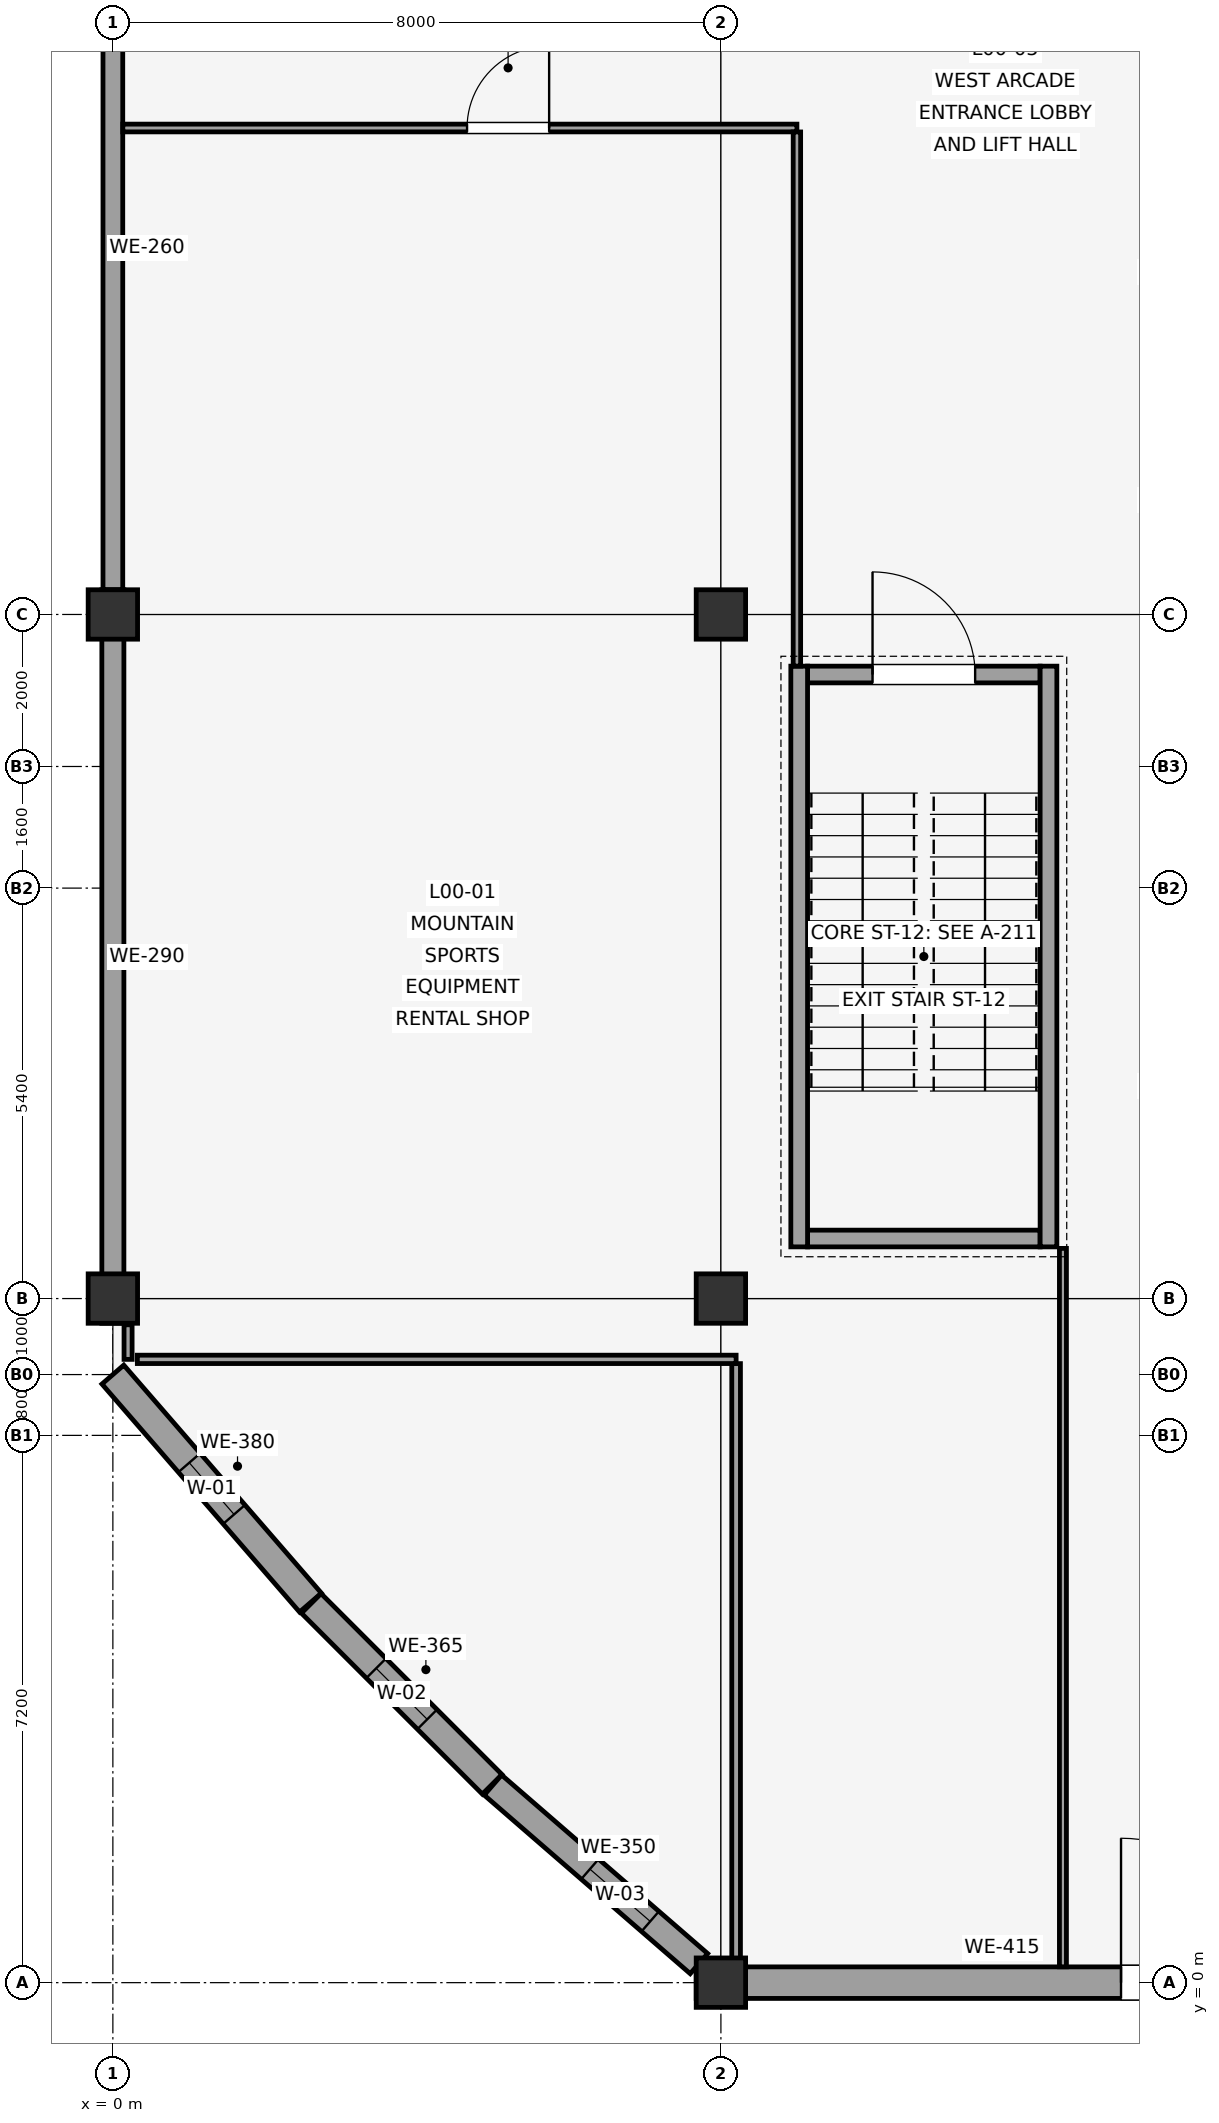
"""IFC4 building model, lengths in metres.
Left out: names, types, materials, properties, quantities, classifications, styles, units other than length and angle.
Written with IfcOpenShell. Run it as: python <this file> out.ifc"""

import sys

from ifc_helpers import new_model, si_unit, direction, frame, frame_2d, origin, origin_2d, place, context, subcontext, project, spatial, rectangle, extrude, element, fill, save


model = new_model("IFC4")
c1 = context("Model", 3, precision=1e-05, world=origin(), true_north=direction((0.0, 1.0)))
c2 = subcontext(c1, "Body", "Model", "MODEL_VIEW")
j1 = project(units=[si_unit("LENGTHUNIT", "METRE"), si_unit("PLANEANGLEUNIT", "RADIAN")], contexts=[c1])
p1 = place(None, origin())
s1 = spatial("IfcSite", under=j1, at=p1, CompositionType="ELEMENT")
p2 = place(p1, origin())
s2 = spatial("IfcBuilding", under=s1, at=p2, CompositionType="ELEMENT")
p3 = place(p2, origin())
s3 = spatial("IfcBuildingStorey", under=s2, at=p3, CompositionType="ELEMENT", Elevation=0.0)
for number, where, z_axis, x_axis in (
    (1, (0.0, 9.0, 0.0), (0.0, 0.0, 1.0), (1.0, 0.0, 0.0)),
    (2, (0.0, 18.0, 0.0), (0.0, 0.0, 1.0), (1.0, 0.0, 0.0)),
    (3, (8.0, 0.0, 0.0), (0.0, 0.0, 1.0), (1.0, 0.0, 0.0)),
    (4, (8.0, 9.0, 0.0), (0.0, 0.0, 1.0), (1.0, 0.0, 0.0)),
    (5, (8.0, 18.0, 0.0), (0.0, 0.0, 1.0), (1.0, 0.0, 0.0)),
):
    element("IfcColumn", number, at=place(p3, frame(where, z_axis=z_axis, x_axis=x_axis)), inside=s3, PredefinedType="COLUMN", context=c2, shape_type="SweptSolid", body=[
        extrude(rectangle(XDim=0.65, YDim=0.65, at=origin_2d()), origin(), (0.0, 0.0, 1.0), 4.5),
    ])
p4 = place(p3, frame((7.675, 0.0, 0.0), z_axis=(0.0, 0.0, 1.0), x_axis=(1.0, 0.0, 0.0)))
e6 = element("IfcWall", 6, at=p4, inside=s3, PredefinedType="SOLIDWALL", context=c2, shape_type="SweptSolid", body=[
    extrude(rectangle(XDim=8.65, YDim=0.415, at=frame_2d((4.325, 0.0))), origin(), (0.0, 0.0, 1.0), 3.12),
])
p5 = place(p4, frame((5.589, 0.0, 0.0)))
e7 = element("IfcOpeningElement", 7, at=p5, cuts=e6, PredefinedType="OPENING", context=c2, shape_type="SweptSolid", body=[
    extrude(rectangle(XDim=1.9, YDim=2.4, at=frame_2d((0.95, 1.2))), frame((0.0, 0.218, 0.0), z_axis=(0.0, -1.0, 0.0), x_axis=(1.0, 0.0, 0.0)), (0.0, 0.0, 1.0), 0.435),
])
p6 = place(p3, frame((0.0, 8.0, 0.0), z_axis=(0.0, 0.0, 1.0), x_axis=(0.654944585876, -0.755676908098, 0.0)))
e8 = element("IfcWall", 8, at=p6, inside=s3, PredefinedType="SOLIDWALL", context=c2, shape_type="SweptSolid", body=[
    extrude(rectangle(XDim=3.97, YDim=0.38, at=frame_2d((1.985, 0.0))), origin(), (0.0, 0.0, 1.0), 3.12),
])
p7 = place(p6, frame((1.535, 0.0, 0.85)))
e9 = element("IfcOpeningElement", 9, at=p7, cuts=e8, PredefinedType="OPENING", context=c2, shape_type="SweptSolid", body=[
    extrude(rectangle(XDim=0.9, YDim=1.8, at=frame_2d((0.45, 0.9))), frame((0.0, 0.2, 0.0), z_axis=(0.0, -1.0, 0.0), x_axis=(1.0, 0.0, 0.0)), (0.0, 0.0, 1.0), 0.4),
])
p8 = place(p3, frame((2.61, 4.99, 0.0), z_axis=(0.0, 0.0, 1.0), x_axis=(0.707143040284, -0.70707052023, 0.0)))
e10 = element("IfcWall", 10, at=p8, inside=s3, PredefinedType="SOLIDWALL", context=c2, shape_type="SweptSolid", body=[
    extrude(rectangle(XDim=3.366, YDim=0.365, at=frame_2d((1.683, 0.0))), origin(), (0.0, 0.0, 1.0), 3.12),
])
p9 = place(p8, frame((1.208, 0.0, 0.85)))
e11 = element("IfcOpeningElement", 11, at=p9, cuts=e10, PredefinedType="OPENING", context=c2, shape_type="SweptSolid", body=[
    extrude(rectangle(XDim=0.95, YDim=1.95, at=frame_2d((0.475, 0.975))), frame((0.0, 0.192, 0.0), z_axis=(0.0, -1.0, 0.0), x_axis=(1.0, 0.0, 0.0)), (0.0, 0.0, 1.0), 0.385),
])
p10 = place(p3, frame((5.0, 2.6, 0.0), z_axis=(0.0, 0.0, 1.0), x_axis=(0.755671119025, -0.654951265264, 0.0)))
e12 = element("IfcWall", 12, at=p10, inside=s3, PredefinedType="SOLIDWALL", context=c2, shape_type="SweptSolid", body=[
    extrude(rectangle(XDim=3.587, YDim=0.35, at=frame_2d((1.794, 0.0))), origin(), (0.0, 0.0, 1.0), 3.12),
])
p11 = place(p10, frame((1.689, 0.0, 0.85)))
e13 = element("IfcOpeningElement", 13, at=p11, cuts=e12, PredefinedType="OPENING", context=c2, shape_type="SweptSolid", body=[
    extrude(rectangle(XDim=1.05, YDim=2.05, at=frame_2d((0.525, 1.025))), frame((0.0, 0.185, 0.0), z_axis=(0.0, -1.0, 0.0), x_axis=(1.0, 0.0, 0.0)), (0.0, 0.0, 1.0), 0.37),
])
p12 = place(p3, frame((0.0, 18.325, 0.0), z_axis=(0.0, 0.0, 1.0), x_axis=(0.0, -1.0, 0.0)))
e14 = element("IfcWall", 14, at=p12, inside=s3, PredefinedType="SOLIDWALL", context=c2, shape_type="SweptSolid", body=[
    extrude(rectangle(XDim=9.65, YDim=0.29, at=frame_2d((4.825, 0.0))), origin(), (0.0, 0.0, 1.0), 3.12),
])
p13 = place(p3, frame((0.0, 27.325, 0.0), z_axis=(0.0, 0.0, 1.0), x_axis=(0.0, -1.0, 0.0)))
e15 = element("IfcWall", 15, at=p13, inside=s3, PredefinedType="SOLIDWALL", context=c2, shape_type="SweptSolid", body=[
    extrude(rectangle(XDim=8.999, YDim=0.26, at=frame_2d((4.5, 0.0))), origin(), (0.0, 0.0, 1.0), 3.12),
])
p14 = place(p3, frame((9.14, 17.21, 0.0), z_axis=(0.0, 0.0, 1.0), x_axis=(1.0, 0.0, 0.0)))
e16 = element("IfcWall", 16, at=p14, inside=s3, PredefinedType="SHEAR", context=c2, shape_type="SweptSolid", body=[
    extrude(rectangle(XDim=3.06, YDim=0.22, at=frame_2d((1.53, 0.0))), origin(), (0.0, 0.0, 1.0), 4.5),
])
p15 = place(p14, frame((0.855, 0.0, 0.0)))
e17 = element("IfcOpeningElement", 17, at=p15, cuts=e16, PredefinedType="OPENING", context=c2, shape_type="SweptSolid", body=[
    extrude(rectangle(XDim=1.35, YDim=2.15, at=frame_2d((0.675, 1.075))), frame((0.0, 0.12, 0.0), z_axis=(0.0, -1.0, 0.0), x_axis=(1.0, 0.0, 0.0)), (0.0, 0.0, 1.0), 0.24),
])
p16 = place(p3, frame((9.14, 9.79, 0.0), z_axis=(0.0, 0.0, 1.0), x_axis=(1.0, 0.0, 0.0)))
e18 = element("IfcWall", 18, at=p16, inside=s3, PredefinedType="SHEAR", context=c2, shape_type="SweptSolid", body=[
    extrude(rectangle(XDim=3.06, YDim=0.22, at=frame_2d((1.53, 0.0))), origin(), (0.0, 0.0, 1.0), 4.5),
])
for number, where, z_axis, x_axis in (
    (19, (9.03, 17.32, 0.0), (0.0, 0.0, 1.0), (0.0, -1.0, 0.0)),
    (20, (12.31, 17.32, 0.0), (0.0, 0.0, 1.0), (0.0, -1.0, 0.0)),
):
    element("IfcWall", number, at=place(p3, frame(where, z_axis=z_axis, x_axis=x_axis)), inside=s3, PredefinedType="SHEAR", context=c2, shape_type="SweptSolid", body=[
        extrude(rectangle(XDim=7.64, YDim=0.22, at=frame_2d((3.82, 0.0))), origin(), (0.0, 0.0, 1.0), 4.5),
    ])
p17 = place(p3, frame((8.2, 0.208, 0.0), z_axis=(0.0, 0.0, 1.0), x_axis=(0.0, 1.0, 0.0)))
e21 = element("IfcWall", 21, at=p17, inside=s3, PredefinedType="PARTITIONING", context=c2, shape_type="SweptSolid", body=[
    extrude(rectangle(XDim=7.936, YDim=0.114, at=frame_2d((3.968, 0.0))), origin(), (0.0, 0.0, 1.0), 2.7),
])
p18 = place(p3, frame((8.2, 8.2, 0.0), z_axis=(0.0, 0.0, 1.0), x_axis=(-1.0, 0.0, 0.0)))
e22 = element("IfcWall", 22, at=p18, inside=s3, PredefinedType="PARTITIONING", context=c2, shape_type="SweptSolid", body=[
    extrude(rectangle(XDim=7.878, YDim=0.11, at=frame_2d((3.939, 0.0))), origin(), (0.0, 0.0, 1.0), 2.7),
])
p19 = place(p3, frame((0.2, 8.2, 0.0), z_axis=(0.0, 0.0, 1.0), x_axis=(0.0, 1.0, 0.0)))
e23 = element("IfcWall", 23, at=p19, inside=s3, PredefinedType="PARTITIONING", context=c2, shape_type="SweptSolid", body=[
    extrude(rectangle(XDim=0.455, YDim=0.106, at=frame_2d((0.228, 0.0))), origin(), (0.0, 0.0, 1.0), 2.7),
])
p20 = place(p3, frame((0.131, 24.4, 0.0), z_axis=(0.0, 0.0, 1.0), x_axis=(1.0, 0.0, 0.0)))
e24 = element("IfcWall", 24, at=p20, inside=s3, PredefinedType="PARTITIONING", context=c2, shape_type="SweptSolid", body=[
    extrude(rectangle(XDim=8.869, YDim=0.102, at=frame_2d((4.435, 0.0))), origin(), (0.0, 0.0, 1.0), 2.7),
])
p21 = place(p20, frame((4.529, 0.0, 0.0)))
e25 = element("IfcOpeningElement", 25, at=p21, cuts=e24, PredefinedType="OPENING", context=c2, shape_type="SweptSolid", body=[
    extrude(rectangle(XDim=1.08, YDim=2.15, at=frame_2d((0.54, 1.075))), frame((0.0, 0.061, 0.0), z_axis=(0.0, -1.0, 0.0), x_axis=(1.0, 0.0, 0.0)), (0.0, 0.0, 1.0), 0.122),
])
p22 = place(p3, frame((9.0, 24.348, 0.0), z_axis=(0.0, 0.0, 1.0), x_axis=(0.0, -1.0, 0.0)))
e26 = element("IfcWall", 26, at=p22, inside=s3, PredefinedType="PARTITIONING", context=c2, shape_type="SweptSolid", body=[
    extrude(rectangle(XDim=7.027, YDim=0.098, at=frame_2d((3.513, 0.0))), origin(), (0.0, 0.0, 1.0), 2.7),
])
p23 = place(p3, frame((12.5, 9.66, 0.0), z_axis=(0.0, 0.0, 1.0), x_axis=(0.0, -1.0, 0.0)))
e27 = element("IfcWall", 27, at=p23, inside=s3, PredefinedType="PARTITIONING", context=c2, shape_type="SweptSolid", body=[
    extrude(rectangle(XDim=9.451, YDim=0.092, at=frame_2d((4.726, 0.0))), origin(), (0.0, 0.0, 1.0), 2.7),
])
p24 = place(p5, origin())
e28 = element("IfcDoor", 28, at=p24, inside=s3, OperationType="DOUBLE_SWING_LEFT", PredefinedType="DOOR", context=c2, shape_type="SweptSolid", body=[
    extrude(rectangle(XDim=1.9, YDim=2.4, at=frame_2d((0.95, 1.2))), frame((0.0, 0.025, 0.0), z_axis=(0.0, -1.0, 0.0), x_axis=(1.0, 0.0, 0.0)), (0.0, 0.0, 1.0), 0.05),
])
fill(e7, e28)
p25 = place(p7, origin())
e29 = element("IfcWindow", 29, at=p25, inside=s3, PartitioningType="SINGLE_PANEL", PredefinedType="WINDOW", context=c2, shape_type="SweptSolid", body=[
    extrude(rectangle(XDim=0.9, YDim=1.8, at=frame_2d((0.45, 0.9))), frame((0.0, 0.03, 0.0), z_axis=(0.0, -1.0, 0.0), x_axis=(1.0, 0.0, 0.0)), (0.0, 0.0, 1.0), 0.06),
])
fill(e9, e29)
p26 = place(p9, origin())
e30 = element("IfcWindow", 30, at=p26, inside=s3, PartitioningType="SINGLE_PANEL", PredefinedType="WINDOW", context=c2, shape_type="SweptSolid", body=[
    extrude(rectangle(XDim=0.95, YDim=1.95, at=frame_2d((0.475, 0.975))), frame((0.0, 0.03, 0.0), z_axis=(0.0, -1.0, 0.0), x_axis=(1.0, 0.0, 0.0)), (0.0, 0.0, 1.0), 0.06),
])
fill(e11, e30)
p27 = place(p11, origin())
e31 = element("IfcWindow", 31, at=p27, inside=s3, PartitioningType="SINGLE_PANEL", PredefinedType="WINDOW", context=c2, shape_type="SweptSolid", body=[
    extrude(rectangle(XDim=1.05, YDim=2.05, at=frame_2d((0.525, 1.025))), frame((0.0, 0.03, 0.0), z_axis=(0.0, -1.0, 0.0), x_axis=(1.0, 0.0, 0.0)), (0.0, 0.0, 1.0), 0.06),
])
fill(e13, e31)
p28 = place(p15, origin())
e32 = element("IfcDoor", 32, at=p28, inside=s3, OperationType="SINGLE_SWING_LEFT", PredefinedType="DOOR", context=c2, shape_type="SweptSolid", body=[
    extrude(rectangle(XDim=1.35, YDim=2.15, at=frame_2d((0.675, 1.075))), frame((0.0, 0.025, 0.0), z_axis=(0.0, -1.0, 0.0), x_axis=(1.0, 0.0, 0.0)), (0.0, 0.0, 1.0), 0.05),
])
fill(e17, e32)
p29 = place(p21, origin())
e33 = element("IfcDoor", 33, at=p29, inside=s3, OperationType="SINGLE_SWING_RIGHT", PredefinedType="DOOR", context=c2, shape_type="SweptSolid", body=[
    extrude(rectangle(XDim=1.08, YDim=2.15, at=frame_2d((0.54, 1.075))), frame((0.0, 0.025, 0.0), z_axis=(0.0, -1.0, 0.0), x_axis=(1.0, 0.0, 0.0)), (0.0, 0.0, 1.0), 0.05),
])
fill(e25, e33)
save(model, sys.argv[1])
